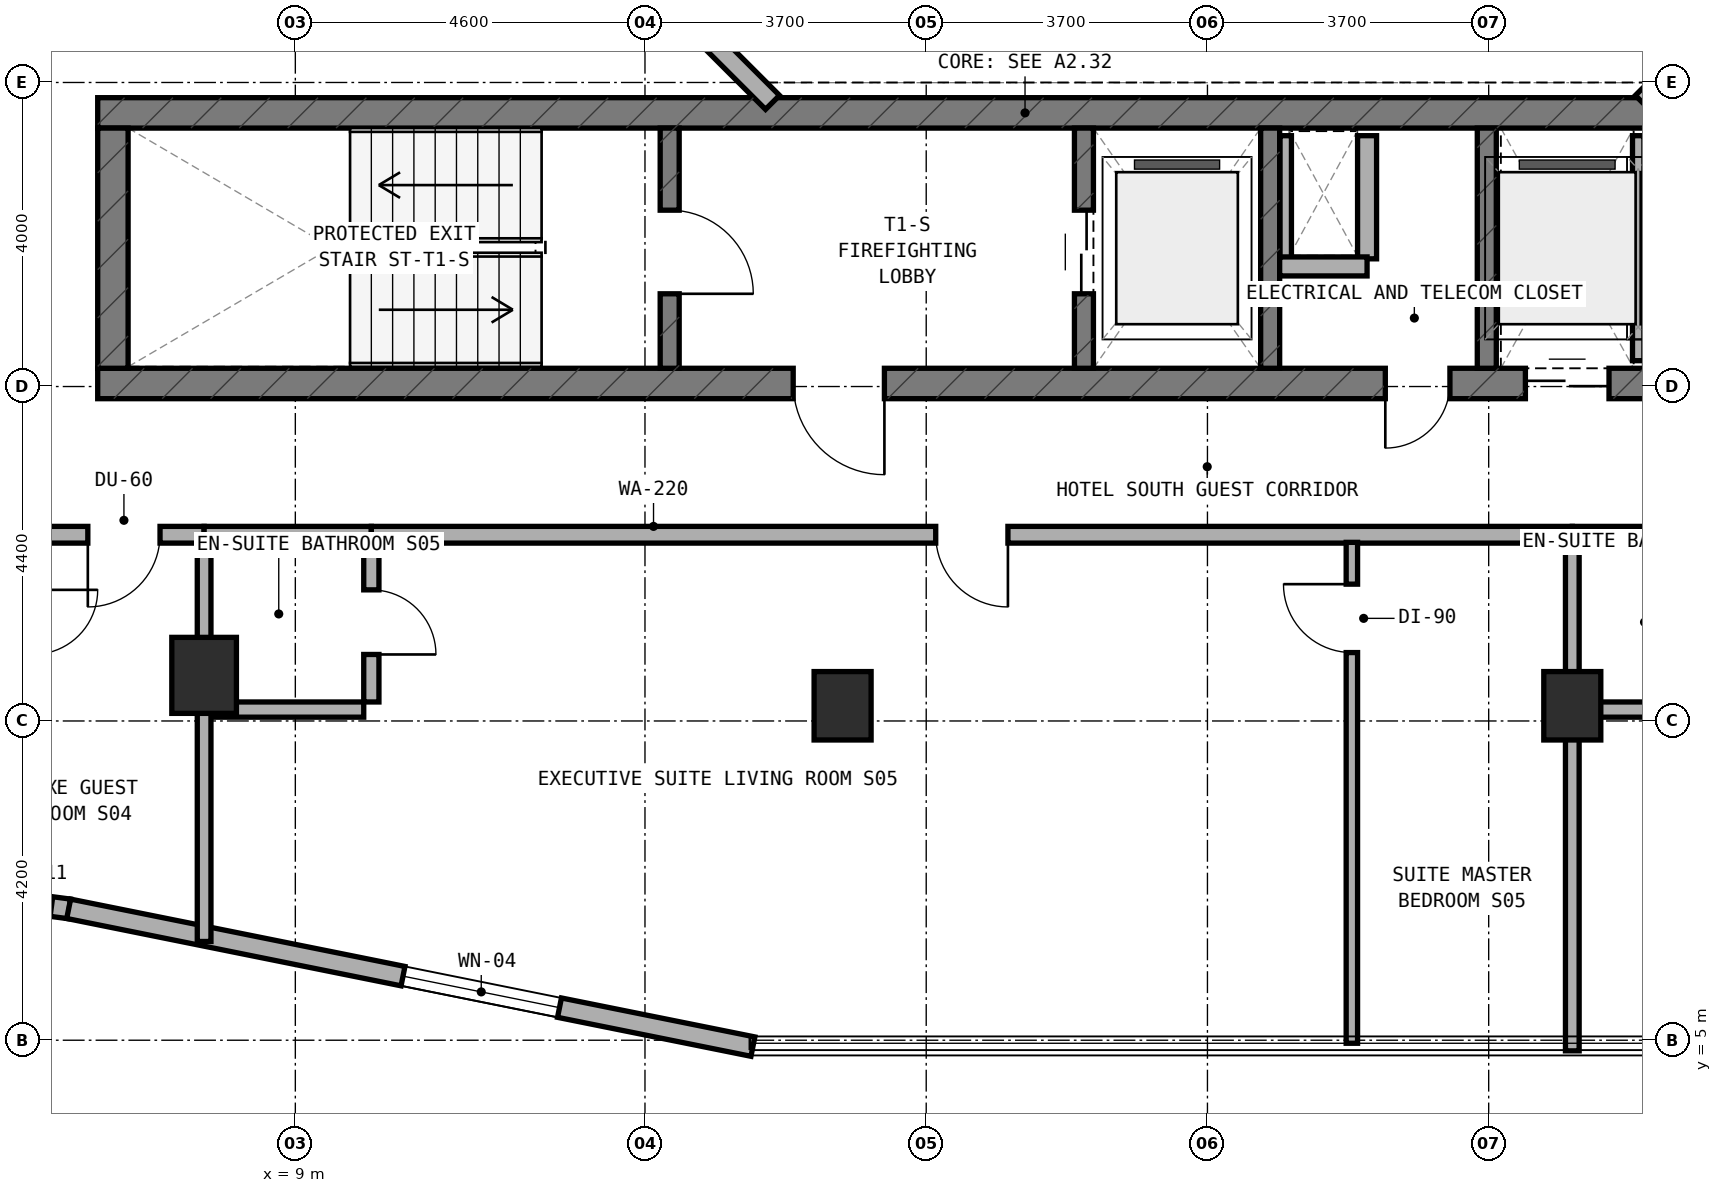
"""IFC4 building model, lengths in metres.
Left out: names, types, materials, properties, quantities, classifications, styles, units other than length and angle.
Written with IfcOpenShell. Run it as: python <this file> out.ifc"""

import sys

from ifc_helpers import new_model, si_unit, direction, frame, frame_2d, origin, origin_2d, place, context, subcontext, project, spatial, rectangle, extrude, element, fill, save


model = new_model("IFC4")
c1 = context("Model", 3, precision=1e-05, world=origin(), true_north=direction((0.0, 1.0)))
c2 = subcontext(c1, "Body", "Model", "MODEL_VIEW")
j1 = project(units=[si_unit("LENGTHUNIT", "METRE"), si_unit("PLANEANGLEUNIT", "RADIAN")], contexts=[c1])
p1 = place(None, origin())
s1 = spatial("IfcSite", under=j1, at=p1, CompositionType="ELEMENT")
p2 = place(p1, origin())
s2 = spatial("IfcBuilding", under=s1, at=p2, CompositionType="ELEMENT")
p3 = place(p2, frame((0.0, 0.0, 138.0)))
s3 = spatial("IfcBuildingStorey", under=s2, at=p3, CompositionType="ELEMENT", Elevation=138.0)
p4 = place(p3, frame((6.4, 13.64, 0.0), z_axis=(0.0, 0.0, 1.0), x_axis=(1.0, 0.0, 0.0)))
e1 = element("IfcWall", 1, at=p4, inside=s3, PredefinedType="SHEAR", context=c2, shape_type="SweptSolid", body=[
    extrude(rectangle(XDim=24.4, YDim=0.4, at=frame_2d((12.2, 0.0))), origin(), (0.0, 0.0, 1.0), 3.5),
])
p5 = place(p4, frame((9.15, 0.0, 0.0)))
e2 = element("IfcOpeningElement", 2, at=p5, cuts=e1, PredefinedType="OPENING", context=c2, shape_type="SweptSolid", body=[
    extrude(rectangle(XDim=1.2, YDim=2.15, at=frame_2d((0.6, 1.075))), frame((0.0, 0.21, 0.0), z_axis=(0.0, -1.0, 0.0), x_axis=(1.0, 0.0, 0.0)), (0.0, 0.0, 1.0), 0.42),
])
p6 = place(p4, frame((16.94, 0.0, 0.0)))
e3 = element("IfcOpeningElement", 3, at=p6, cuts=e1, PredefinedType="OPENING", context=c2, shape_type="SweptSolid", body=[
    extrude(rectangle(XDim=0.85, YDim=2.1, at=frame_2d((0.425, 1.05))), frame((0.0, 0.21, 0.0), z_axis=(0.0, -1.0, 0.0), x_axis=(1.0, 0.0, 0.0)), (0.0, 0.0, 1.0), 0.42),
])
p7 = place(p4, frame((18.783, 0.0, 0.0)))
e4 = element("IfcOpeningElement", 4, at=p7, cuts=e1, PredefinedType="OPENING", context=c2, shape_type="SweptSolid", body=[
    extrude(rectangle(XDim=1.1, YDim=2.15, at=frame_2d((0.55, 1.075))), frame((0.0, 0.21, 0.0), z_axis=(0.0, -1.0, 0.0), x_axis=(1.0, 0.0, 0.0)), (0.0, 0.0, 1.0), 0.42),
])
p8 = place(p4, frame((20.65, 0.0, 0.0)))
e5 = element("IfcOpeningElement", 5, at=p8, cuts=e1, PredefinedType="OPENING", context=c2, shape_type="SweptSolid", body=[
    extrude(rectangle(XDim=1.1, YDim=2.15, at=frame_2d((0.55, 1.075))), frame((0.0, 0.21, 0.0), z_axis=(0.0, -1.0, 0.0), x_axis=(1.0, 0.0, 0.0)), (0.0, 0.0, 1.0), 0.42),
])
p9 = place(p4, frame((22.517, 0.0, 0.0)))
e6 = element("IfcOpeningElement", 6, at=p9, cuts=e1, PredefinedType="OPENING", context=c2, shape_type="SweptSolid", body=[
    extrude(rectangle(XDim=1.1, YDim=2.15, at=frame_2d((0.55, 1.075))), frame((0.0, 0.21, 0.0), z_axis=(0.0, -1.0, 0.0), x_axis=(1.0, 0.0, 0.0)), (0.0, 0.0, 1.0), 0.42),
])
p10 = place(p3, frame((6.4, 17.2, 0.0), z_axis=(0.0, 0.0, 1.0), x_axis=(1.0, 0.0, 0.0)))
e7 = element("IfcWall", 7, at=p10, inside=s3, PredefinedType="SHEAR", context=c2, shape_type="SweptSolid", body=[
    extrude(rectangle(XDim=24.4, YDim=0.4, at=frame_2d((12.2, 0.0))), origin(), (0.0, 0.0, 1.0), 3.5),
])
p11 = place(p3, frame((6.6, 13.84, 0.0), z_axis=(0.0, 0.0, 1.0), x_axis=(0.0, 1.0, 0.0)))
e8 = element("IfcWall", 8, at=p11, inside=s3, PredefinedType="SHEAR", context=c2, shape_type="SweptSolid", body=[
    extrude(rectangle(XDim=3.16, YDim=0.4, at=frame_2d((1.58, 0.0))), origin(), (0.0, 0.0, 1.0), 3.5),
])
p12 = place(p3, frame((13.925, 13.84, 0.0), z_axis=(0.0, 0.0, 1.0), x_axis=(0.0, 1.0, 0.0)))
e9 = element("IfcWall", 9, at=p12, inside=s3, PredefinedType="STANDARD", context=c2, shape_type="SweptSolid", body=[
    extrude(rectangle(XDim=3.16, YDim=0.25, at=frame_2d((1.58, 0.0))), origin(), (0.0, 0.0, 1.0), 3.22),
])
p13 = place(p12, frame((0.98, 0.0, 0.0)))
e10 = element("IfcOpeningElement", 10, at=p13, cuts=e9, PredefinedType="OPENING", context=c2, shape_type="SweptSolid", body=[
    extrude(rectangle(XDim=1.1, YDim=2.15, at=frame_2d((0.55, 1.075))), frame((0.0, 0.135, 0.0), z_axis=(0.0, -1.0, 0.0), x_axis=(1.0, 0.0, 0.0)), (0.0, 0.0, 1.0), 0.27),
])
p14 = place(p3, frame((19.375, 13.84, 0.0), z_axis=(0.0, 0.0, 1.0), x_axis=(0.0, 1.0, 0.0)))
e11 = element("IfcWall", 11, at=p14, inside=s3, PredefinedType="STANDARD", context=c2, shape_type="SweptSolid", body=[
    extrude(rectangle(XDim=3.16, YDim=0.25, at=frame_2d((1.58, 0.0))), origin(), (0.0, 0.0, 1.0), 3.22),
])
p15 = place(p14, frame((0.98, 0.0, 0.0)))
e12 = element("IfcOpeningElement", 12, at=p15, cuts=e11, PredefinedType="OPENING", context=c2, shape_type="SweptSolid", body=[
    extrude(rectangle(XDim=1.1, YDim=2.15, at=frame_2d((0.55, 1.075))), frame((0.0, 0.135, 0.0), z_axis=(0.0, -1.0, 0.0), x_axis=(1.0, 0.0, 0.0)), (0.0, 0.0, 1.0), 0.27),
])
for number, where, z_axis, x_axis in (
    (13, (21.825, 13.84, 0.0), (0.0, 0.0, 1.0), (0.0, 1.0, 0.0)),
    (14, (24.675, 13.84, 0.0), (0.0, 0.0, 1.0), (0.0, 1.0, 0.0)),
):
    element("IfcWall", number, at=place(p3, frame(where, z_axis=z_axis, x_axis=x_axis)), inside=s3, PredefinedType="STANDARD", context=c2, shape_type="SweptSolid", body=[
        extrude(rectangle(XDim=3.16, YDim=0.25, at=frame_2d((1.58, 0.0))), origin(), (0.0, 0.0, 1.0), 3.22),
    ])
for number, where, z_axis, x_axis in (
    (15, (16.2, 9.4, 0.0), (0.0, 0.0, 1.0), (1.0, 0.0, 0.0)),
    (16, (25.8, 9.4, 0.0), (0.0, 0.0, 1.0), (1.0, 0.0, 0.0)),
):
    element("IfcColumn", number, at=place(p3, frame(where, z_axis=z_axis, x_axis=x_axis)), inside=s3, PredefinedType="COLUMN", context=c2, shape_type="SweptSolid", body=[
        extrude(rectangle(XDim=0.75, YDim=0.9, at=origin_2d()), origin(), (0.0, 0.0, 1.0), 3.5),
    ])
p16 = place(p3, frame((7.8, 9.8, 0.0), z_axis=(0.0, 0.0, 1.0), x_axis=(1.0, 0.0, 0.0)))
e17 = element("IfcColumn", 17, at=p16, inside=s3, PredefinedType="COLUMN", context=c2, shape_type="SweptSolid", body=[
    extrude(rectangle(XDim=0.85, YDim=1.0, at=origin_2d()), origin(), (0.0, 0.0, 1.0), 3.5),
])
p17 = place(p3, frame((5.112, 6.848, 0.0), z_axis=(0.0, 0.0, 1.0), x_axis=(0.991487658083, -0.130200706103, 0.0)))
e18 = element("IfcWall", 18, at=p17, inside=s3, PredefinedType="STANDARD", context=c2, shape_type="SweptSolid", body=[
    extrude(rectangle(XDim=0.921, YDim=0.26, at=frame_2d((0.46, 0.0))), origin(), (0.0, 0.0, 1.0), 3.22),
])
p18 = place(p17, frame((0.235, 0.0, 0.85)))
e19 = element("IfcOpeningElement", 19, at=p18, cuts=e18, PredefinedType="OPENING", context=c2, shape_type="SweptSolid", body=[
    extrude(rectangle(XDim=0.45, YDim=1.5, at=frame_2d((0.225, 0.75))), frame((0.0, 0.14, 0.0), z_axis=(0.0, -1.0, 0.0), x_axis=(1.0, 0.0, 0.0)), (0.0, 0.0, 1.0), 0.28),
])
p19 = place(p3, frame((6.018, 6.729, 0.0), z_axis=(0.0, 0.0, 1.0), x_axis=(0.980315963543, -0.197435082048, 0.0)))
e20 = element("IfcWall", 20, at=p19, inside=s3, PredefinedType="STANDARD", context=c2, shape_type="SweptSolid", body=[
    extrude(rectangle(XDim=9.183, YDim=0.26, at=frame_2d((4.591, 0.0))), origin(), (0.0, 0.0, 1.0), 3.22),
])
p20 = place(p19, frame((4.487, 0.0, 0.85)))
e21 = element("IfcOpeningElement", 21, at=p20, cuts=e20, PredefinedType="OPENING", context=c2, shape_type="SweptSolid", body=[
    extrude(rectangle(XDim=2.1, YDim=1.5, at=frame_2d((1.05, 0.75))), frame((0.0, 0.14, 0.0), z_axis=(0.0, -1.0, 0.0), x_axis=(1.0, 0.0, 0.0)), (0.0, 0.0, 1.0), 0.28),
])
for number, where, z_axis, x_axis in (
    (22, (26.722, 17.338, 0.0), (0.0, 0.0, 1.0), (0.707, 0.707, 0.0)),
    (23, (13.444, 19.172, 0.0), (0.0, 0.0, 1.0), (0.707, -0.707, 0.0)),
):
    element("IfcWall", number, at=place(p3, frame(where, z_axis=z_axis, x_axis=x_axis)), inside=s3, PredefinedType="STANDARD", context=c2, shape_type="SweptSolid", body=[
        extrude(rectangle(XDim=2.594, YDim=0.26, at=frame_2d((1.297, 0.0))), origin(), (0.0, 0.0, 1.0), 3.22),
    ])
p21 = place(p3, frame((22.03, 15.28, 0.0), z_axis=(0.0, 0.0, 1.0), x_axis=(0.0, 1.0, 0.0)))
e24 = element("IfcWall", 24, at=p21, inside=s3, PredefinedType="PARTITIONING", context=c2, shape_type="SweptSolid", body=[
    extrude(rectangle(XDim=1.62, YDim=0.15, at=frame_2d((0.81, 0.0))), origin(), (0.0, 0.0, 1.0), 3.22),
])
p22 = place(p3, frame((23.1, 15.28, 0.0), z_axis=(0.0, 0.0, 1.0), x_axis=(0.0, 1.0, 0.0)))
e25 = element("IfcWall", 25, at=p22, inside=s3, PredefinedType="SOLIDWALL", context=c2, shape_type="SweptSolid", body=[
    extrude(rectangle(XDim=1.62, YDim=0.25, at=frame_2d((0.81, 0.0))), origin(), (0.0, 0.0, 1.0), 3.22),
])
p23 = place(p3, frame((21.95, 15.18, 0.0), z_axis=(0.0, 0.0, 1.0), x_axis=(1.0, 0.0, 0.0)))
e26 = element("IfcWall", 26, at=p23, inside=s3, PredefinedType="SOLIDWALL", context=c2, shape_type="SweptSolid", body=[
    extrude(rectangle(XDim=1.15, YDim=0.25, at=frame_2d((0.575, 0.0))), origin(), (0.0, 0.0, 1.0), 3.22),
])
p24 = place(p3, frame((26.667, 13.94, 0.0), z_axis=(0.0, 0.0, 1.0), x_axis=(0.0, 1.0, 0.0)))
e27 = element("IfcWall", 27, at=p24, inside=s3, PredefinedType="PARTITIONING", context=c2, shape_type="SweptSolid", body=[
    extrude(rectangle(XDim=2.96, YDim=0.15, at=frame_2d((1.48, 0.0))), origin(), (0.0, 0.0, 1.0), 3.22),
])
p25 = place(p3, frame((5.55, 11.65, 0.0), z_axis=(0.0, 0.0, 1.0), x_axis=(1.0, 0.0, 0.0)))
e28 = element("IfcWall", 28, at=p25, inside=s3, PredefinedType="SOLIDWALL", context=c2, shape_type="SweptSolid", body=[
    extrude(rectangle(XDim=2.25, YDim=0.22, at=frame_2d((1.125, 0.0))), origin(), (0.0, 0.0, 1.0), 2.695),
])
p26 = place(p25, frame((0.72, 0.0, 0.0)))
e29 = element("IfcOpeningElement", 29, at=p26, cuts=e28, PredefinedType="OPENING", context=c2, shape_type="SweptSolid", body=[
    extrude(rectangle(XDim=0.95, YDim=2.1, at=frame_2d((0.475, 1.05))), frame((0.0, 0.12, 0.0), z_axis=(0.0, -1.0, 0.0), x_axis=(1.0, 0.0, 0.0)), (0.0, 0.0, 1.0), 0.24),
])
p27 = place(p3, frame((7.8, 6.299, 0.0), z_axis=(0.0, 0.0, 1.0), x_axis=(0.0, 1.0, 0.0)))
e30 = element("IfcWall", 30, at=p27, inside=s3, PredefinedType="SOLIDWALL", context=c2, shape_type="SweptSolid", body=[
    extrude(rectangle(XDim=5.351, YDim=0.18, at=frame_2d((2.675, 0.0))), origin(), (0.0, 0.0, 1.0), 2.695),
])
p28 = place(p3, frame((10.0, 9.45, 0.0), z_axis=(0.0, 0.0, 1.0), x_axis=(0.0, 1.0, 0.0)))
e31 = element("IfcWall", 31, at=p28, inside=s3, PredefinedType="PLUMBINGWALL", context=c2, shape_type="SweptSolid", body=[
    extrude(rectangle(XDim=2.1, YDim=0.2, at=frame_2d((1.05, 0.0))), origin(), (0.0, 0.0, 1.0), 2.835),
])
p29 = place(p28, frame((0.625, 0.0, 0.0)))
e32 = element("IfcOpeningElement", 32, at=p29, cuts=e31, PredefinedType="OPENING", context=c2, shape_type="SweptSolid", body=[
    extrude(rectangle(XDim=0.85, YDim=2.1, at=frame_2d((0.425, 1.05))), frame((0.0, 0.11, 0.0), z_axis=(0.0, -1.0, 0.0), x_axis=(1.0, 0.0, 0.0)), (0.0, 0.0, 1.0), 0.22),
])
p30 = place(p3, frame((7.9, 9.35, 0.0), z_axis=(0.0, 0.0, 1.0), x_axis=(1.0, 0.0, 0.0)))
e33 = element("IfcWall", 33, at=p30, inside=s3, PredefinedType="PLUMBINGWALL", context=c2, shape_type="SweptSolid", body=[
    extrude(rectangle(XDim=2.0, YDim=0.2, at=frame_2d((1.0, 0.0))), origin(), (0.0, 0.0, 1.0), 3.22),
])
p31 = place(p3, frame((7.8, 11.65, 0.0), z_axis=(0.0, 0.0, 1.0), x_axis=(1.0, 0.0, 0.0)))
e34 = element("IfcWall", 34, at=p31, inside=s3, PredefinedType="SOLIDWALL", context=c2, shape_type="SweptSolid", body=[
    extrude(rectangle(XDim=2.2, YDim=0.22, at=frame_2d((1.1, 0.0))), origin(), (0.0, 0.0, 1.0), 2.695),
])
p32 = place(p3, frame((10.0, 11.65, 0.0), z_axis=(0.0, 0.0, 1.0), x_axis=(1.0, 0.0, 0.0)))
e35 = element("IfcWall", 35, at=p32, inside=s3, PredefinedType="SOLIDWALL", context=c2, shape_type="SweptSolid", body=[
    extrude(rectangle(XDim=15.8, YDim=0.22, at=frame_2d((7.9, 0.0))), origin(), (0.0, 0.0, 1.0), 2.695),
])
p33 = place(p32, frame((7.425, 0.0, 0.0)))
e36 = element("IfcOpeningElement", 36, at=p33, cuts=e35, PredefinedType="OPENING", context=c2, shape_type="SweptSolid", body=[
    extrude(rectangle(XDim=0.95, YDim=2.1, at=frame_2d((0.475, 1.05))), frame((0.0, 0.12, 0.0), z_axis=(0.0, -1.0, 0.0), x_axis=(1.0, 0.0, 0.0)), (0.0, 0.0, 1.0), 0.24),
])
p34 = place(p3, frame((22.9, 4.96, 0.0), z_axis=(0.0, 0.0, 1.0), x_axis=(0.0, 1.0, 0.0)))
e37 = element("IfcWall", 37, at=p34, inside=s3, PredefinedType="PARTITIONING", context=c2, shape_type="SweptSolid", body=[
    extrude(rectangle(XDim=6.59, YDim=0.15, at=frame_2d((3.295, 0.0))), origin(), (0.0, 0.0, 1.0), 2.835),
])
p35 = place(p34, frame((5.14, 0.0, 0.0)))
e38 = element("IfcOpeningElement", 38, at=p35, cuts=e37, PredefinedType="OPENING", context=c2, shape_type="SweptSolid", body=[
    extrude(rectangle(XDim=0.9, YDim=2.1, at=frame_2d((0.45, 1.05))), frame((0.0, 0.085, 0.0), z_axis=(0.0, -1.0, 0.0), x_axis=(1.0, 0.0, 0.0)), (0.0, 0.0, 1.0), 0.17),
])
p36 = place(p3, frame((25.8, 4.86, 0.0), z_axis=(0.0, 0.0, 1.0), x_axis=(0.0, 1.0, 0.0)))
e39 = element("IfcWall", 39, at=p36, inside=s3, PredefinedType="SOLIDWALL", context=c2, shape_type="SweptSolid", body=[
    extrude(rectangle(XDim=6.79, YDim=0.18, at=frame_2d((3.395, 0.0))), origin(), (0.0, 0.0, 1.0), 2.695),
])
p37 = place(p3, frame((25.9, 9.35, 0.0), z_axis=(0.0, 0.0, 1.0), x_axis=(1.0, 0.0, 0.0)))
e40 = element("IfcWall", 40, at=p37, inside=s3, PredefinedType="PLUMBINGWALL", context=c2, shape_type="SweptSolid", body=[
    extrude(rectangle(XDim=2.0, YDim=0.2, at=frame_2d((1.0, 0.0))), origin(), (0.0, 0.0, 1.0), 2.835),
])
p38 = place(p3, frame((25.8, 11.65, 0.0), z_axis=(0.0, 0.0, 1.0), x_axis=(1.0, 0.0, 0.0)))
e41 = element("IfcWall", 41, at=p38, inside=s3, PredefinedType="SOLIDWALL", context=c2, shape_type="SweptSolid", body=[
    extrude(rectangle(XDim=2.2, YDim=0.22, at=frame_2d((1.1, 0.0))), origin(), (0.0, 0.0, 1.0), 2.695),
])
p39 = place(p20, origin())
e42 = element("IfcWindow", 42, at=p39, inside=s3, PartitioningType="SINGLE_PANEL", PredefinedType="WINDOW", context=c2, shape_type="SweptSolid", body=[
    extrude(rectangle(XDim=2.1, YDim=1.5, at=frame_2d((1.05, 0.75))), frame((0.0, 0.03, 0.0), z_axis=(0.0, -1.0, 0.0), x_axis=(1.0, 0.0, 0.0)), (0.0, 0.0, 1.0), 0.06),
])
fill(e21, e42)
p40 = place(p13, frame((1.1, 0.0, 0.0), z_axis=(0.0, 0.0, 1.0), x_axis=(-1.0, 0.0, 0.0)))
e43 = element("IfcDoor", 43, at=p40, inside=s3, OperationType="SINGLE_SWING_RIGHT", PredefinedType="DOOR", context=c2, shape_type="SweptSolid", body=[
    extrude(rectangle(XDim=1.1, YDim=2.15, at=frame_2d((0.55, 1.075))), frame((0.0, 0.025, 0.0), z_axis=(0.0, -1.0, 0.0), x_axis=(1.0, 0.0, 0.0)), (0.0, 0.0, 1.0), 0.05),
])
fill(e10, e43)
p41 = place(p5, frame((1.2, 0.0, 0.0), z_axis=(0.0, 0.0, 1.0), x_axis=(-1.0, 0.0, 0.0)))
e44 = element("IfcDoor", 44, at=p41, inside=s3, OperationType="SINGLE_SWING_LEFT", PredefinedType="DOOR", context=c2, shape_type="SweptSolid", body=[
    extrude(rectangle(XDim=1.2, YDim=2.15, at=frame_2d((0.6, 1.075))), frame((0.0, 0.025, 0.0), z_axis=(0.0, -1.0, 0.0), x_axis=(1.0, 0.0, 0.0)), (0.0, 0.0, 1.0), 0.05),
])
fill(e2, e44)
p42 = place(p15, origin())
e45 = element("IfcDoor", 45, at=p42, inside=s3, OperationType="DOUBLE_DOOR_SLIDING", PredefinedType="DOOR", context=c2, shape_type="SweptSolid", body=[
    extrude(rectangle(XDim=1.1, YDim=2.15, at=frame_2d((0.55, 1.075))), frame((0.0, 0.025, 0.0), z_axis=(0.0, -1.0, 0.0), x_axis=(1.0, 0.0, 0.0)), (0.0, 0.0, 1.0), 0.05),
])
fill(e12, e45)
p43 = place(p6, frame((0.85, 0.0, 0.0), z_axis=(0.0, 0.0, 1.0), x_axis=(-1.0, 0.0, 0.0)))
e46 = element("IfcDoor", 46, at=p43, inside=s3, OperationType="SINGLE_SWING_RIGHT", PredefinedType="DOOR", context=c2, shape_type="SweptSolid", body=[
    extrude(rectangle(XDim=0.85, YDim=2.1, at=frame_2d((0.425, 1.05))), frame((0.0, 0.025, 0.0), z_axis=(0.0, -1.0, 0.0), x_axis=(1.0, 0.0, 0.0)), (0.0, 0.0, 1.0), 0.05),
])
fill(e3, e46)
p44 = place(p7, frame((1.1, 0.0, 0.0), z_axis=(0.0, 0.0, 1.0), x_axis=(-1.0, 0.0, 0.0)))
e47 = element("IfcDoor", 47, at=p44, inside=s3, OperationType="DOUBLE_DOOR_SLIDING", PredefinedType="DOOR", context=c2, shape_type="SweptSolid", body=[
    extrude(rectangle(XDim=1.1, YDim=2.15, at=frame_2d((0.55, 1.075))), frame((0.0, 0.025, 0.0), z_axis=(0.0, -1.0, 0.0), x_axis=(1.0, 0.0, 0.0)), (0.0, 0.0, 1.0), 0.05),
])
fill(e4, e47)
p45 = place(p26, frame((0.95, 0.0, 0.0), z_axis=(0.0, 0.0, 1.0), x_axis=(-1.0, 0.0, 0.0)))
e48 = element("IfcDoor", 48, at=p45, inside=s3, OperationType="SINGLE_SWING_RIGHT", PredefinedType="DOOR", context=c2, shape_type="SweptSolid", body=[
    extrude(rectangle(XDim=0.95, YDim=2.1, at=frame_2d((0.475, 1.05))), frame((0.0, 0.025, 0.0), z_axis=(0.0, -1.0, 0.0), x_axis=(1.0, 0.0, 0.0)), (0.0, 0.0, 1.0), 0.05),
])
fill(e29, e48)
p46 = place(p29, frame((0.85, 0.0, 0.0), z_axis=(0.0, 0.0, 1.0), x_axis=(-1.0, 0.0, 0.0)))
e49 = element("IfcDoor", 49, at=p46, inside=s3, OperationType="SINGLE_SWING_RIGHT", PredefinedType="DOOR", context=c2, shape_type="SweptSolid", body=[
    extrude(rectangle(XDim=0.85, YDim=2.1, at=frame_2d((0.425, 1.05))), frame((0.0, 0.025, 0.0), z_axis=(0.0, -1.0, 0.0), x_axis=(1.0, 0.0, 0.0)), (0.0, 0.0, 1.0), 0.05),
])
fill(e32, e49)
p47 = place(p33, frame((0.95, 0.0, 0.0), z_axis=(0.0, 0.0, 1.0), x_axis=(-1.0, 0.0, 0.0)))
e50 = element("IfcDoor", 50, at=p47, inside=s3, OperationType="SINGLE_SWING_LEFT", PredefinedType="DOOR", context=c2, shape_type="SweptSolid", body=[
    extrude(rectangle(XDim=0.95, YDim=2.1, at=frame_2d((0.475, 1.05))), frame((0.0, 0.025, 0.0), z_axis=(0.0, -1.0, 0.0), x_axis=(1.0, 0.0, 0.0)), (0.0, 0.0, 1.0), 0.05),
])
fill(e36, e50)
p48 = place(p35, origin())
e51 = element("IfcDoor", 51, at=p48, inside=s3, OperationType="SINGLE_SWING_RIGHT", PredefinedType="DOOR", context=c2, shape_type="SweptSolid", body=[
    extrude(rectangle(XDim=0.9, YDim=2.1, at=frame_2d((0.45, 1.05))), frame((0.0, 0.025, 0.0), z_axis=(0.0, -1.0, 0.0), x_axis=(1.0, 0.0, 0.0)), (0.0, 0.0, 1.0), 0.05),
])
fill(e38, e51)
save(model, sys.argv[1])
